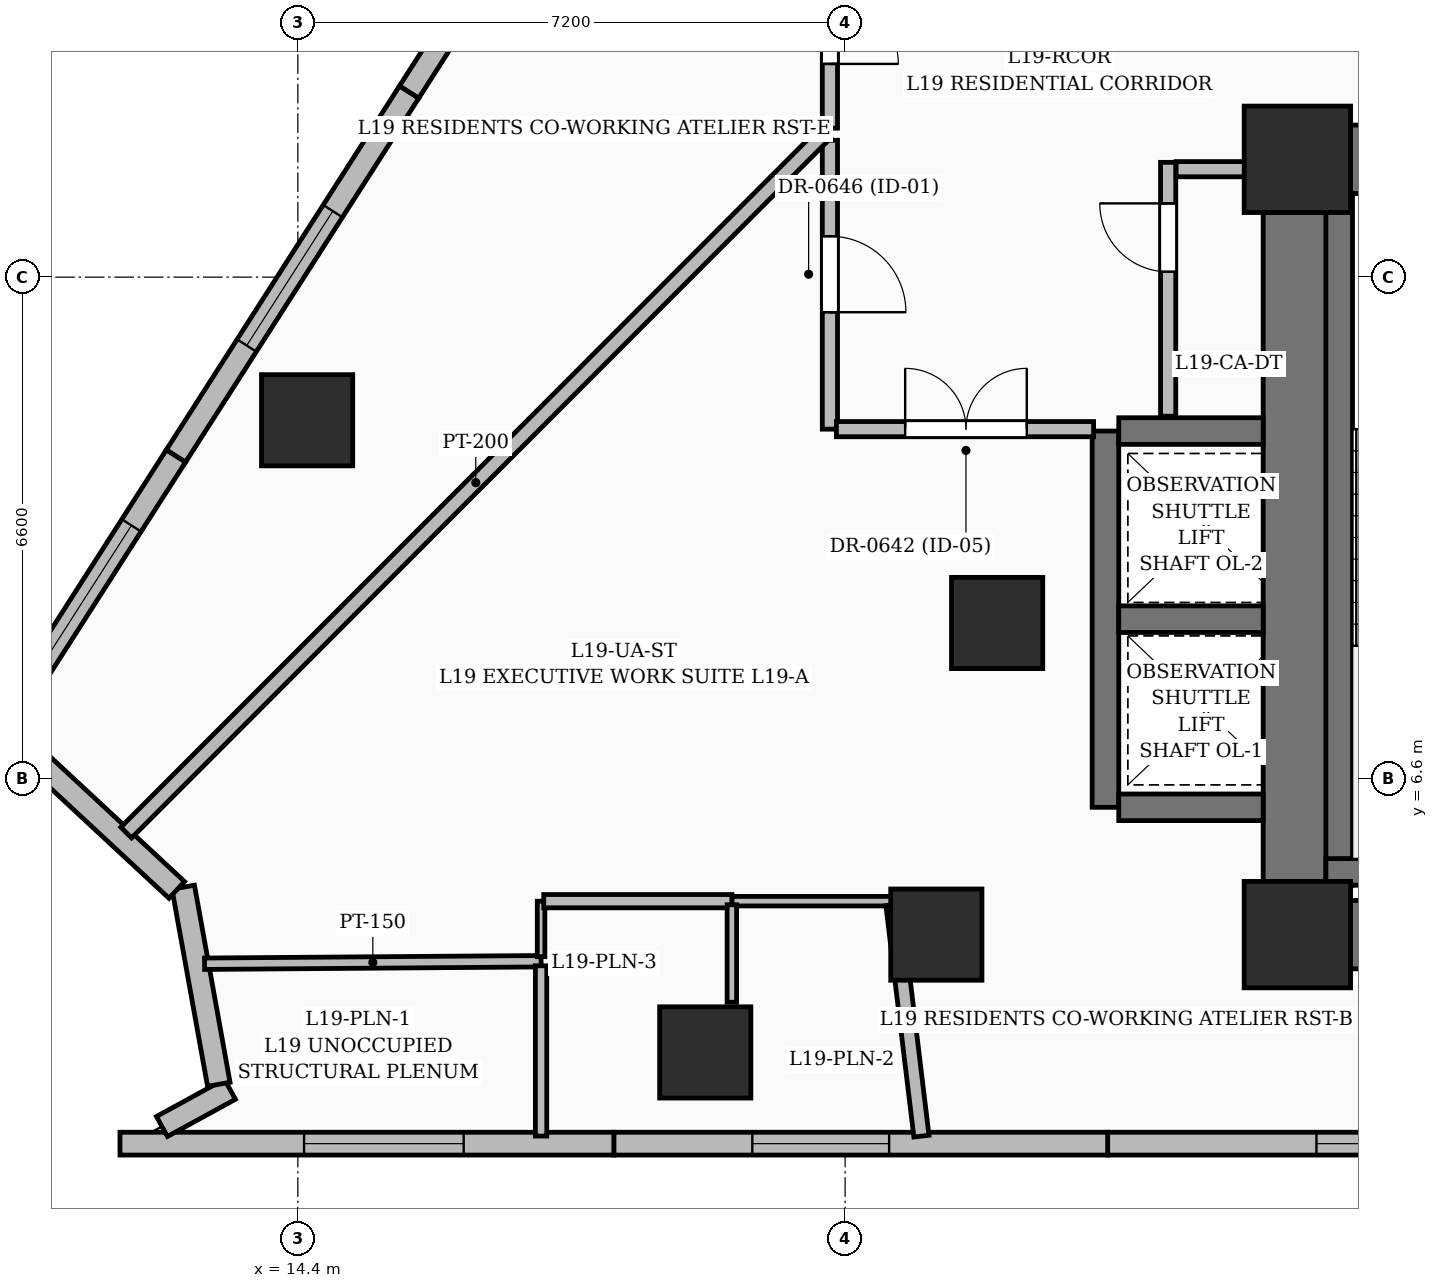
"""IFC4 building model, lengths in metres.
Left out: names, types, materials, properties, quantities, classifications, styles, units other than length and angle.
Written with IfcOpenShell. Run it as: python <this file> out.ifc"""

import sys

from ifc_helpers import new_model, si_unit, direction, frame, frame_2d, origin, origin_2d, place, context, subcontext, project, spatial, rectangle, extrude, element, fill, save


model = new_model("IFC4")
c1 = context("Model", 3, precision=1e-05, world=origin(), true_north=direction((0.0, 1.0)))
c2 = subcontext(c1, "Body", "Model", "MODEL_VIEW")
j1 = project(units=[si_unit("LENGTHUNIT", "METRE"), si_unit("PLANEANGLEUNIT", "RADIAN")], contexts=[c1])
p1 = place(None, origin())
s1 = spatial("IfcSite", under=j1, at=p1, CompositionType="ELEMENT")
p2 = place(p1, origin())
s2 = spatial("IfcBuilding", under=s1, at=p2, CompositionType="ELEMENT")
p3 = place(p2, frame((0.0, 0.0, 78.6)))
s3 = spatial("IfcBuildingStorey", under=s2, at=p3, CompositionType="ELEMENT", Elevation=78.6)
for number, where, z_axis, x_axis in (
    (1, (27.55, 4.55, 0.0), (0.0, 0.0, 1.0), (1.0, 0.0, 0.0)),
    (2, (27.55, 14.75, 0.0), (0.0, 0.0, 1.0), (1.0, 0.0, 0.0)),
):
    element("IfcColumn", number, at=place(p3, frame(where, z_axis=z_axis, x_axis=x_axis)), inside=s3, PredefinedType="COLUMN", context=c2, shape_type="SweptSolid", body=[
        extrude(rectangle(XDim=1.4, YDim=1.4, at=origin_2d()), origin(), (0.0, 0.0, 1.0), 3.6),
    ])
for number, where, z_axis, x_axis in (
    (3, (22.8, 4.55, 0.0), (0.0, 0.0, 1.0), (1.0, 0.0, 0.0)),
    (4, (23.6, 8.65, 0.0), (0.0, 0.0, 1.0), (1.0, 0.0, 0.0)),
):
    element("IfcColumn", number, at=place(p3, frame(where, z_axis=z_axis, x_axis=x_axis)), inside=s3, PredefinedType="COLUMN", context=c2, shape_type="SweptSolid", body=[
        extrude(rectangle(XDim=1.2, YDim=1.2, at=origin_2d()), origin(), (0.0, 0.0, 1.0), 3.6),
    ])
p4 = place(p3, frame((28.25, 4.55, 0.0), z_axis=(0.0, 0.0, 1.0), x_axis=(1.0, 0.0, 0.0)))
e5 = element("IfcWall", 5, at=p4, inside=s3, PredefinedType="SHEAR", context=c2, shape_type="SweptSolid", body=[
    extrude(rectangle(XDim=6.2, YDim=0.9, at=frame_2d((3.1, 0.0))), origin(), (0.0, 0.0, 1.0), 3.6),
])
p5 = place(p3, frame((28.25, 14.75, 0.0), z_axis=(0.0, 0.0, 1.0), x_axis=(1.0, 0.0, 0.0)))
e6 = element("IfcWall", 6, at=p5, inside=s3, PredefinedType="SHEAR", context=c2, shape_type="SweptSolid", body=[
    extrude(rectangle(XDim=6.2, YDim=0.9, at=frame_2d((3.1, 0.0))), origin(), (0.0, 0.0, 1.0), 3.6),
])
p6 = place(p5, frame((0.925, 0.0, 0.0)))
e7 = element("IfcOpeningElement", 7, at=p6, cuts=e6, PredefinedType="OPENING", context=c2, shape_type="SweptSolid", body=[
    extrude(rectangle(XDim=1.05, YDim=2.15, at=frame_2d((0.525, 1.075))), frame((0.0, 0.46, 0.0), z_axis=(0.0, -1.0, 0.0), x_axis=(1.0, 0.0, 0.0)), (0.0, 0.0, 1.0), 0.92),
])
p7 = place(p3, frame((27.55, 5.25, 0.0), z_axis=(0.0, 0.0, 1.0), x_axis=(0.0, 1.0, 0.0)))
e8 = element("IfcWall", 8, at=p7, inside=s3, PredefinedType="SHEAR", context=c2, shape_type="SweptSolid", body=[
    extrude(rectangle(XDim=8.8, YDim=0.9, at=frame_2d((4.4, 0.0))), origin(), (0.0, 0.0, 1.0), 3.6),
])
p8 = place(p3, frame((28.1, 5.2, 0.0), z_axis=(0.0, 0.0, 1.0), x_axis=(0.0, 1.0, 0.0)))
e9 = element("IfcWall", 9, at=p8, inside=s3, PredefinedType="SOLIDWALL", context=c2, shape_type="SweptSolid", body=[
    extrude(rectangle(XDim=9.1, YDim=0.35, at=frame_2d((4.55, 0.0))), origin(), (0.0, 0.0, 1.0), 3.6),
])
p9 = place(p3, frame((27.925, 5.375, 0.0), z_axis=(0.0, 0.0, 1.0), x_axis=(1.0, 0.0, 0.0)))
e10 = element("IfcWall", 10, at=p9, inside=s3, PredefinedType="SOLIDWALL", context=c2, shape_type="SweptSolid", body=[
    extrude(rectangle(XDim=3.55, YDim=0.35, at=frame_2d((1.775, 0.0))), origin(), (0.0, 0.0, 1.0), 3.6),
])
p10 = place(p3, frame((25.025, 6.225, 0.0), z_axis=(0.0, 0.0, 1.0), x_axis=(0.0, 1.0, 0.0)))
e11 = element("IfcWall", 11, at=p10, inside=s3, PredefinedType="SOLIDWALL", context=c2, shape_type="SweptSolid", body=[
    extrude(rectangle(XDim=4.95, YDim=0.35, at=frame_2d((2.475, 0.0))), origin(), (0.0, 0.0, 1.0), 3.6),
])
for number, where, z_axis, x_axis in (
    (12, (25.2, 6.225, 0.0), (0.0, 0.0, 1.0), (1.0, 0.0, 0.0)),
    (13, (25.2, 8.7, 0.0), (0.0, 0.0, 1.0), (1.0, 0.0, 0.0)),
    (14, (25.2, 11.175, 0.0), (0.0, 0.0, 1.0), (1.0, 0.0, 0.0)),
):
    element("IfcWall", number, at=place(p3, frame(where, z_axis=z_axis, x_axis=x_axis)), inside=s3, PredefinedType="SOLIDWALL", context=c2, shape_type="SweptSolid", body=[
        extrude(rectangle(XDim=1.9, YDim=0.35, at=frame_2d((0.95, 0.0))), origin(), (0.0, 0.0, 1.0), 3.6),
    ])
for number, where, z_axis, x_axis in (
    (15, (19.76, 3.0, 0.0), (0.0, 0.0, 1.0), (1.0, 0.0, 0.0)),
    (16, (14.522, 11.317, 0.0), (0.0, 0.0, 1.0), (1.0, 0.0, 0.0)),
):
    element("IfcColumn", number, at=place(p3, frame(where, z_axis=z_axis, x_axis=x_axis)), inside=s3, PredefinedType="COLUMN", context=c2, shape_type="SweptSolid", body=[
        extrude(rectangle(XDim=1.2, YDim=1.2, at=origin_2d()), origin(), (0.0, 0.0, 1.0), 3.6),
    ])
p11 = place(p3, frame((31.551, 1.8, 0.0), z_axis=(0.0, 0.0, 1.0), x_axis=(-1.0, 0.0, 0.0)))
e17 = element("IfcWall", 17, at=p11, inside=s3, PredefinedType="SOLIDWALL", context=c2, shape_type="SweptSolid", body=[
    extrude(rectangle(XDim=6.497, YDim=0.3, at=frame_2d((3.249, 0.0))), origin(), (0.0, 0.0, 1.0), 3.35),
])
p12 = place(p11, frame((2.55, 0.0, 0.8)))
e18 = element("IfcOpeningElement", 18, at=p12, cuts=e17, PredefinedType="OPENING", context=c2, shape_type="SweptSolid", body=[
    extrude(rectangle(XDim=1.2, YDim=1.8, at=frame_2d((0.6, 0.9))), frame((0.0, 0.16, 0.0), z_axis=(0.0, -1.0, 0.0), x_axis=(1.0, 0.0, 0.0)), (0.0, 0.0, 1.0), 0.32),
])
p13 = place(p3, frame((25.054, 1.8, 0.0), z_axis=(0.0, 0.0, 1.0), x_axis=(-1.0, 0.0, 0.0)))
e19 = element("IfcWall", 19, at=p13, inside=s3, PredefinedType="SOLIDWALL", context=c2, shape_type="SweptSolid", body=[
    extrude(rectangle(XDim=6.497, YDim=0.3, at=frame_2d((3.249, 0.0))), origin(), (0.0, 0.0, 1.0), 3.35),
])
p14 = place(p13, frame((2.875, 0.0, 0.6)))
e20 = element("IfcOpeningElement", 20, at=p14, cuts=e19, PredefinedType="OPENING", context=c2, shape_type="SweptSolid", body=[
    extrude(rectangle(XDim=1.8, YDim=2.1, at=frame_2d((0.9, 1.05))), frame((0.0, 0.16, 0.0), z_axis=(0.0, -1.0, 0.0), x_axis=(1.0, 0.0, 0.0)), (0.0, 0.0, 1.0), 0.32),
])
p15 = place(p3, frame((18.557, 1.8, 0.0), z_axis=(0.0, 0.0, 1.0), x_axis=(-1.0, 0.0, 0.0)))
e21 = element("IfcWall", 21, at=p15, inside=s3, PredefinedType="SOLIDWALL", context=c2, shape_type="SweptSolid", body=[
    extrude(rectangle(XDim=6.497, YDim=0.3, at=frame_2d((3.249, 0.0))), origin(), (0.0, 0.0, 1.0), 3.35),
])
p16 = place(p15, frame((1.975, 0.0, 0.55)))
e22 = element("IfcOpeningElement", 22, at=p16, cuts=e21, PredefinedType="OPENING", context=c2, shape_type="SweptSolid", body=[
    extrude(rectangle(XDim=2.1, YDim=2.4, at=frame_2d((1.05, 1.2))), frame((0.0, 0.16, 0.0), z_axis=(0.0, -1.0, 0.0), x_axis=(1.0, 0.0, 0.0)), (0.0, 0.0, 1.0), 0.32),
])
p17 = place(p3, frame((12.612, 2.026, 0.0), z_axis=(0.0, 0.0, 1.0), x_axis=(0.877245120991, 0.480042704036, 0.0)))
e23 = element("IfcWall", 23, at=p17, inside=s3, PredefinedType="SOLIDWALL", context=c2, shape_type="SweptSolid", body=[
    extrude(rectangle(XDim=1.02, YDim=0.3, at=frame_2d((0.51, 0.0))), origin(), (0.0, 0.0, 1.0), 3.35),
])
p18 = place(p3, frame((13.36, 2.581, 0.0), z_axis=(0.0, 0.0, 1.0), x_axis=(-0.177621463404, 0.984098885142, 0.0)))
e24 = element("IfcWall", 24, at=p18, inside=s3, PredefinedType="SOLIDWALL", context=c2, shape_type="SweptSolid", body=[
    extrude(rectangle(XDim=2.635, YDim=0.3, at=frame_2d((1.317, 0.0))), origin(), (0.0, 0.0, 1.0), 3.35),
])
p19 = place(p3, frame((12.807, 5.138, 0.0), z_axis=(0.0, 0.0, 1.0), x_axis=(-0.732670686937, 0.680583326642, 0.0)))
e25 = element("IfcWall", 25, at=p19, inside=s3, PredefinedType="SOLIDWALL", context=c2, shape_type="SweptSolid", body=[
    extrude(rectangle(XDim=2.62, YDim=0.3, at=frame_2d((1.31, 0.0))), origin(), (0.0, 0.0, 1.0), 3.35),
])
p20 = place(p3, frame((10.061, 6.578, 0.0), z_axis=(0.0, 0.0, 1.0), x_axis=(0.539464859434, 0.842008114828, 0.0)))
e26 = element("IfcWall", 26, at=p20, inside=s3, PredefinedType="SOLIDWALL", context=c2, shape_type="SweptSolid", body=[
    extrude(rectangle(XDim=5.071, YDim=0.3, at=frame_2d((2.536, 0.0))), origin(), (0.0, 0.0, 1.0), 3.35),
])
p21 = place(p20, frame((1.585, 0.0, 0.6)))
e27 = element("IfcOpeningElement", 27, at=p21, cuts=e26, PredefinedType="OPENING", context=c2, shape_type="SweptSolid", body=[
    extrude(rectangle(XDim=2.4, YDim=2.1, at=frame_2d((1.2, 1.05))), frame((0.0, 0.16, 0.0), z_axis=(0.0, -1.0, 0.0), x_axis=(1.0, 0.0, 0.0)), (0.0, 0.0, 1.0), 0.32),
])
p22 = place(p3, frame((12.797, 10.848, 0.0), z_axis=(0.0, 0.0, 1.0), x_axis=(0.539467898562, 0.842006167686, 0.0)))
e28 = element("IfcWall", 28, at=p22, inside=s3, PredefinedType="SOLIDWALL", context=c2, shape_type="SweptSolid", body=[
    extrude(rectangle(XDim=5.686, YDim=0.3, at=frame_2d((2.843, 0.0))), origin(), (0.0, 0.0, 1.0), 3.35),
])
p23 = place(p22, frame((1.725, 0.0, 0.55)))
e29 = element("IfcOpeningElement", 29, at=p23, cuts=e28, PredefinedType="OPENING", context=c2, shape_type="SweptSolid", body=[
    extrude(rectangle(XDim=2.1, YDim=2.4, at=frame_2d((1.05, 1.2))), frame((0.0, 0.16, 0.0), z_axis=(0.0, -1.0, 0.0), x_axis=(1.0, 0.0, 0.0)), (0.0, 0.0, 1.0), 0.32),
])
p24 = place(p3, frame((15.864, 15.635, 0.0), z_axis=(0.0, 0.0, 1.0), x_axis=(0.53944798429, 0.842018926299, 0.0)))
e30 = element("IfcWall", 30, at=p24, inside=s3, PredefinedType="SOLIDWALL", context=c2, shape_type="SweptSolid", body=[
    extrude(rectangle(XDim=5.411, YDim=0.3, at=frame_2d((2.706, 0.0))), origin(), (0.0, 0.0, 1.0), 3.35),
])
p25 = place(p24, frame((1.875, 0.0, 0.6)))
e31 = element("IfcOpeningElement", 31, at=p25, cuts=e30, PredefinedType="OPENING", context=c2, shape_type="SweptSolid", body=[
    extrude(rectangle(XDim=1.8, YDim=2.1, at=frame_2d((0.9, 1.05))), frame((0.0, 0.16, 0.0), z_axis=(0.0, -1.0, 0.0), x_axis=(1.0, 0.0, 0.0)), (0.0, 0.0, 1.0), 0.32),
])
p26 = place(p3, frame((25.85, 11.37, 0.0), z_axis=(0.0, 0.0, 1.0), x_axis=(0.0, 1.0, 0.0)))
e32 = element("IfcWall", 32, at=p26, inside=s3, PredefinedType="PARTITIONING", context=c2, shape_type="SweptSolid", body=[
    extrude(rectangle(XDim=3.34, YDim=0.2, at=frame_2d((1.67, 0.0))), origin(), (0.0, 0.0, 1.0), 3.35),
])
p27 = place(p26, frame((1.9, 0.0, 0.0)))
e33 = element("IfcOpeningElement", 33, at=p27, cuts=e32, PredefinedType="OPENING", context=c2, shape_type="SweptSolid", body=[
    extrude(rectangle(XDim=0.9, YDim=2.1, at=frame_2d((0.45, 1.05))), frame((0.0, 0.11, 0.0), z_axis=(0.0, -1.0, 0.0), x_axis=(1.0, 0.0, 0.0)), (0.0, 0.0, 1.0), 0.22),
])
p28 = place(p3, frame((25.955, 14.62, 0.0), z_axis=(0.0, 0.0, 1.0), x_axis=(1.0, 0.0, 0.0)))
e34 = element("IfcWall", 34, at=p28, inside=s3, PredefinedType="PARTITIONING", context=c2, shape_type="SweptSolid", body=[
    extrude(rectangle(XDim=1.13, YDim=0.2, at=frame_2d((0.565, 0.0))), origin(), (0.0, 0.0, 1.0), 3.35),
])
p29 = place(p3, frame((21.4, 15.0, 0.0), z_axis=(0.0, 0.0, 1.0), x_axis=(0.0, -1.0, 0.0)))
e35 = element("IfcWall", 35, at=p29, inside=s3, PredefinedType="PARTITIONING", context=c2, shape_type="SweptSolid", body=[
    extrude(rectangle(XDim=3.8, YDim=0.2, at=frame_2d((1.9, 0.0))), origin(), (0.0, 0.0, 1.0), 3.01),
])
p30 = place(p29, frame((1.262, 0.0, 0.0)))
e36 = element("IfcOpeningElement", 36, at=p30, cuts=e35, PredefinedType="OPENING", context=c2, shape_type="SweptSolid", body=[
    extrude(rectangle(XDim=1.0, YDim=2.2, at=frame_2d((0.5, 1.1))), frame((0.0, 0.11, 0.0), z_axis=(0.0, -1.0, 0.0), x_axis=(1.0, 0.0, 0.0)), (0.0, 0.0, 1.0), 0.22),
])
p31 = place(p3, frame((21.485, 11.2, 0.0), z_axis=(0.0, 0.0, 1.0), x_axis=(1.0, 0.0, 0.0)))
e37 = element("IfcWall", 37, at=p31, inside=s3, PredefinedType="PARTITIONING", context=c2, shape_type="SweptSolid", body=[
    extrude(rectangle(XDim=3.384, YDim=0.2, at=frame_2d((1.692, 0.0))), origin(), (0.0, 0.0, 1.0), 3.35),
])
p32 = place(p31, frame((0.905, 0.0, 0.0)))
e38 = element("IfcOpeningElement", 38, at=p32, cuts=e37, PredefinedType="OPENING", context=c2, shape_type="SweptSolid", body=[
    extrude(rectangle(XDim=1.6, YDim=2.3, at=frame_2d((0.8, 1.15))), frame((0.0, 0.11, 0.0), z_axis=(0.0, -1.0, 0.0), x_axis=(1.0, 0.0, 0.0)), (0.0, 0.0, 1.0), 0.22),
])
p33 = place(p3, frame((21.4, 17.75, 0.0), z_axis=(0.0, 0.0, 1.0), x_axis=(0.0, -1.0, 0.0)))
e39 = element("IfcWall", 39, at=p33, inside=s3, PredefinedType="PARTITIONING", context=c2, shape_type="SweptSolid", body=[
    extrude(rectangle(XDim=2.59, YDim=0.2, at=frame_2d((1.295, 0.0))), origin(), (0.0, 0.0, 1.0), 3.01),
])
p34 = place(p33, frame((0.845, 0.0, 0.0)))
e40 = element("IfcOpeningElement", 40, at=p34, cuts=e39, PredefinedType="OPENING", context=c2, shape_type="SweptSolid", body=[
    extrude(rectangle(XDim=0.9, YDim=2.1, at=frame_2d((0.45, 1.05))), frame((0.0, 0.11, 0.0), z_axis=(0.0, -1.0, 0.0), x_axis=(1.0, 0.0, 0.0)), (0.0, 0.0, 1.0), 0.22),
])
p35 = place(p3, frame((13.173, 4.167, 0.0), z_axis=(0.0, 0.0, 1.0), x_axis=(0.999972287215, 0.007444783476, 0.0)))
e41 = element("IfcWall", 41, at=p35, inside=s3, PredefinedType="PARTITIONING", context=c2, shape_type="SweptSolid", body=[
    extrude(rectangle(XDim=4.427, YDim=0.15, at=frame_2d((2.214, 0.0))), origin(), (0.0, 0.0, 1.0), 3.35),
])
p36 = place(p3, frame((20.11, 4.99, 0.0), z_axis=(0.0, 0.0, 1.0), x_axis=(1.0, 0.0, 0.0)))
e42 = element("IfcWall", 42, at=p36, inside=s3, PredefinedType="PARTITIONING", context=c2, shape_type="SweptSolid", body=[
    extrude(rectangle(XDim=2.12, YDim=0.125, at=frame_2d((1.06, 0.0))), origin(), (0.0, 0.0, 1.0), 3.01),
])
p37 = place(p3, frame((17.6, 4.26, 0.0), z_axis=(0.0, 0.0, 1.0), x_axis=(0.0, 1.0, 0.0)))
e43 = element("IfcWall", 43, at=p37, inside=s3, PredefinedType="PARTITIONING", context=c2, shape_type="SweptSolid", body=[
    extrude(rectangle(XDim=0.73, YDim=0.1, at=frame_2d((0.365, 0.0))), origin(), (0.0, 0.0, 1.0), 3.35),
])
p38 = place(p3, frame((17.635, 4.99, 0.0), z_axis=(0.0, 0.0, 1.0), x_axis=(1.0, 0.0, 0.0)))
e44 = element("IfcWall", 44, at=p38, inside=s3, PredefinedType="PARTITIONING", context=c2, shape_type="SweptSolid", body=[
    extrude(rectangle(XDim=2.475, YDim=0.175, at=frame_2d((1.238, 0.0))), origin(), (0.0, 0.0, 1.0), 2.37),
])
p39 = place(p3, frame((21.34, 15.1, 0.0), z_axis=(0.0, 0.0, 1.0), x_axis=(-0.706759638276, -0.707453753756, 0.0)))
e45 = element("IfcWall", 45, at=p39, inside=s3, PredefinedType="PARTITIONING", context=c2, shape_type="SweptSolid", body=[
    extrude(rectangle(XDim=13.014, YDim=0.2, at=frame_2d((6.507, 0.0))), origin(), (0.0, 0.0, 1.0), 2.345),
])
p40 = place(p3, frame((17.6, 1.9, 0.0), z_axis=(0.0, 0.0, 1.0), x_axis=(0.0, 1.0, 0.0)))
e46 = element("IfcWall", 46, at=p40, inside=s3, PredefinedType="PARTITIONING", context=c2, shape_type="SweptSolid", body=[
    extrude(rectangle(XDim=2.24, YDim=0.15, at=frame_2d((1.12, 0.0))), origin(), (0.0, 0.0, 1.0), 3.35),
])
p41 = place(p3, frame((20.11, 4.942, 0.0), z_axis=(0.0, 0.0, 1.0), x_axis=(0.0, -1.0, 0.0)))
e47 = element("IfcWall", 47, at=p41, inside=s3, PredefinedType="PARTITIONING", context=c2, shape_type="SweptSolid", body=[
    extrude(rectangle(XDim=1.282, YDim=0.125, at=frame_2d((0.641, 0.0))), origin(), (0.0, 0.0, 1.0), 3.01),
])
p42 = place(p3, frame((22.604, 1.899, 0.0), z_axis=(0.0, 0.0, 1.0), x_axis=(-0.120074545748, 0.992764878238, 0.0)))
e48 = element("IfcWall", 48, at=p42, inside=s3, PredefinedType="PARTITIONING", context=c2, shape_type="SweptSolid", body=[
    extrude(rectangle(XDim=3.066, YDim=0.2, at=frame_2d((1.533, 0.0))), origin(), (0.0, 0.0, 1.0), 2.345),
])
p43 = place(p12, origin())
e49 = element("IfcWindow", 49, at=p43, inside=s3, PartitioningType="SINGLE_PANEL", PredefinedType="WINDOW", context=c2, shape_type="SweptSolid", body=[
    extrude(rectangle(XDim=1.2, YDim=1.8, at=frame_2d((0.6, 0.9))), frame((0.0, 0.03, 0.0), z_axis=(0.0, -1.0, 0.0), x_axis=(1.0, 0.0, 0.0)), (0.0, 0.0, 1.0), 0.06),
])
fill(e18, e49)
p44 = place(p14, origin())
e50 = element("IfcWindow", 50, at=p44, inside=s3, PartitioningType="SINGLE_PANEL", PredefinedType="WINDOW", context=c2, shape_type="SweptSolid", body=[
    extrude(rectangle(XDim=1.8, YDim=2.1, at=frame_2d((0.9, 1.05))), frame((0.0, 0.03, 0.0), z_axis=(0.0, -1.0, 0.0), x_axis=(1.0, 0.0, 0.0)), (0.0, 0.0, 1.0), 0.06),
])
fill(e20, e50)
p45 = place(p16, origin())
e51 = element("IfcWindow", 51, at=p45, inside=s3, PartitioningType="SINGLE_PANEL", PredefinedType="WINDOW", context=c2, shape_type="SweptSolid", body=[
    extrude(rectangle(XDim=2.1, YDim=2.4, at=frame_2d((1.05, 1.2))), frame((0.0, 0.03, 0.0), z_axis=(0.0, -1.0, 0.0), x_axis=(1.0, 0.0, 0.0)), (0.0, 0.0, 1.0), 0.06),
])
fill(e22, e51)
p46 = place(p21, origin())
e52 = element("IfcWindow", 52, at=p46, inside=s3, PartitioningType="SINGLE_PANEL", PredefinedType="WINDOW", context=c2, shape_type="SweptSolid", body=[
    extrude(rectangle(XDim=2.4, YDim=2.1, at=frame_2d((1.2, 1.05))), frame((0.0, 0.03, 0.0), z_axis=(0.0, -1.0, 0.0), x_axis=(1.0, 0.0, 0.0)), (0.0, 0.0, 1.0), 0.06),
])
fill(e27, e52)
p47 = place(p23, origin())
e53 = element("IfcWindow", 53, at=p47, inside=s3, PartitioningType="SINGLE_PANEL", PredefinedType="WINDOW", context=c2, shape_type="SweptSolid", body=[
    extrude(rectangle(XDim=2.1, YDim=2.4, at=frame_2d((1.05, 1.2))), frame((0.0, 0.03, 0.0), z_axis=(0.0, -1.0, 0.0), x_axis=(1.0, 0.0, 0.0)), (0.0, 0.0, 1.0), 0.06),
])
fill(e29, e53)
p48 = place(p27, origin())
e54 = element("IfcDoor", 54, at=p48, inside=s3, OperationType="SINGLE_SWING_RIGHT", PredefinedType="DOOR", context=c2, shape_type="SweptSolid", body=[
    extrude(rectangle(XDim=0.9, YDim=2.1, at=frame_2d((0.45, 1.05))), frame((0.0, 0.025, 0.0), z_axis=(0.0, -1.0, 0.0), x_axis=(1.0, 0.0, 0.0)), (0.0, 0.0, 1.0), 0.05),
])
fill(e33, e54)
p49 = place(p32, origin())
e55 = element("IfcDoor", 55, at=p49, inside=s3, OperationType="DOUBLE_DOOR_SINGLE_SWING", PredefinedType="DOOR", context=c2, shape_type="SweptSolid", body=[
    extrude(rectangle(XDim=1.6, YDim=2.3, at=frame_2d((0.8, 1.15))), frame((0.0, 0.025, 0.0), z_axis=(0.0, -1.0, 0.0), x_axis=(1.0, 0.0, 0.0)), (0.0, 0.0, 1.0), 0.05),
])
fill(e38, e55)
p50 = place(p34, origin())
e56 = element("IfcDoor", 56, at=p50, inside=s3, OperationType="SINGLE_SWING_RIGHT", PredefinedType="DOOR", context=c2, shape_type="SweptSolid", body=[
    extrude(rectangle(XDim=0.9, YDim=2.1, at=frame_2d((0.45, 1.05))), frame((0.0, 0.025, 0.0), z_axis=(0.0, -1.0, 0.0), x_axis=(1.0, 0.0, 0.0)), (0.0, 0.0, 1.0), 0.05),
])
fill(e40, e56)
p51 = place(p30, origin())
e57 = element("IfcDoor", 57, at=p51, inside=s3, OperationType="SINGLE_SWING_RIGHT", PredefinedType="DOOR", context=c2, shape_type="SweptSolid", body=[
    extrude(rectangle(XDim=1.0, YDim=2.2, at=frame_2d((0.5, 1.1))), frame((0.0, 0.025, 0.0), z_axis=(0.0, -1.0, 0.0), x_axis=(1.0, 0.0, 0.0)), (0.0, 0.0, 1.0), 0.05),
])
fill(e36, e57)
save(model, sys.argv[1])
